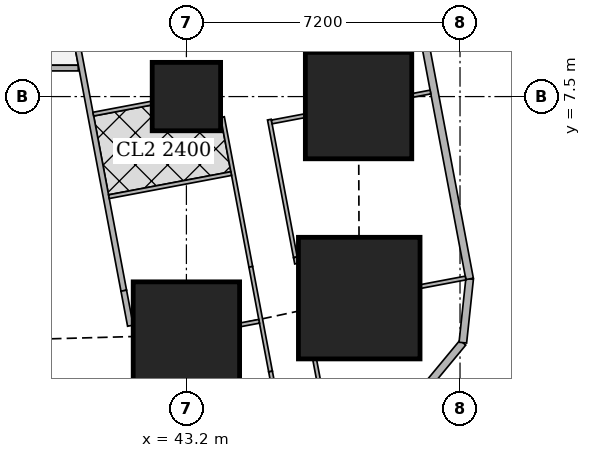
"""IFC4 building model, lengths in metres.
Left out: names, types, materials, properties, quantities, classifications, styles, units other than length and angle.
Written with IfcOpenShell. Run it as: python <this file> out.ifc"""

import sys

from ifc_helpers import new_model, si_unit, direction, frame, frame_2d, origin, origin_2d, place, context, subcontext, project, spatial, rectangle, extrude, element, fill, save


model = new_model("IFC4")
c1 = context("Model", 3, precision=1e-05, world=origin(), true_north=direction((0.0, 1.0)))
c2 = subcontext(c1, "Body", "Model", "MODEL_VIEW")
j1 = project(units=[si_unit("LENGTHUNIT", "METRE"), si_unit("PLANEANGLEUNIT", "RADIAN")], contexts=[c1])
p1 = place(None, origin())
s1 = spatial("IfcSite", under=j1, at=p1, CompositionType="ELEMENT")
p2 = place(p1, origin())
s2 = spatial("IfcBuilding", under=s1, at=p2, CompositionType="ELEMENT")
p3 = place(p2, frame((0.0, 0.0, 53.75)))
s3 = spatial("IfcBuildingStorey", under=s2, at=p3, CompositionType="ELEMENT", Elevation=53.75)
p4 = place(p3, frame((43.2, 1.225, 0.0), z_axis=(0.0, 0.0, 1.0), x_axis=(1.0, 0.0, 0.0)))
e1 = element("IfcColumn", 1, at=p4, inside=s3, PredefinedType="COLUMN", context=c2, shape_type="SweptSolid", body=[
    extrude(rectangle(XDim=2.8, YDim=2.8, at=origin_2d()), origin(), (0.0, 0.0, 1.0), 3.75),
])
p5 = place(p3, frame((47.748, 2.197, 0.0), z_axis=(0.0, 0.0, 1.0), x_axis=(1.0, 0.0, 0.0)))
e2 = element("IfcColumn", 2, at=p5, inside=s3, PredefinedType="COLUMN", context=c2, shape_type="SweptSolid", body=[
    extrude(rectangle(XDim=3.2, YDim=3.2, at=origin_2d()), origin(), (0.0, 0.0, 1.0), 3.75),
])
p6 = place(p3, frame((43.2, 7.5, 0.0), z_axis=(0.0, 0.0, 1.0), x_axis=(1.0, 0.0, 0.0)))
e3 = element("IfcColumn", 3, at=p6, inside=s3, PredefinedType="COLUMN", context=c2, shape_type="SweptSolid", body=[
    extrude(rectangle(XDim=1.8, YDim=1.8, at=origin_2d()), origin(), (0.0, 0.0, 1.0), 3.75),
])
p7 = place(p3, frame((47.73, 7.263, 0.0), z_axis=(0.0, 0.0, 1.0), x_axis=(1.0, 0.0, 0.0)))
e4 = element("IfcColumn", 4, at=p7, inside=s3, PredefinedType="COLUMN", context=c2, shape_type="SweptSolid", body=[
    extrude(rectangle(XDim=2.8, YDim=2.8, at=origin_2d()), origin(), (0.0, 0.0, 1.0), 3.75),
])
p8 = place(p3, frame((49.407, -0.263, 0.0), z_axis=(0.0, 0.0, 1.0), x_axis=(0.638042593423, 0.770001070764, 0.0)))
e5 = element("IfcWall", 5, at=p8, inside=s3, PredefinedType="SOLIDWALL", context=c2, shape_type="SweptSolid", body=[
    extrude(rectangle(XDim=1.673, YDim=0.2, at=frame_2d((0.836, 0.0))), origin(), (0.0, 0.0, 1.0), 3.5),
])
p9 = place(p3, frame((50.474, 1.025, 0.0), z_axis=(0.0, 0.0, 1.0), x_axis=(0.106047815515, 0.994361031429, 0.0)))
e6 = element("IfcWall", 6, at=p9, inside=s3, PredefinedType="SOLIDWALL", context=c2, shape_type="SweptSolid", body=[
    extrude(rectangle(XDim=1.688, YDim=0.2, at=frame_2d((0.844, 0.0))), origin(), (0.0, 0.0, 1.0), 3.5),
])
p10 = place(p3, frame((50.653, 2.703, 0.0), z_axis=(0.0, 0.0, 1.0), x_axis=(-0.185612026696, 0.982623109613, 0.0)))
e7 = element("IfcWall", 7, at=p10, inside=s3, PredefinedType="SOLIDWALL", context=c2, shape_type="SweptSolid", body=[
    extrude(rectangle(XDim=41.393, YDim=0.2, at=frame_2d((20.697, 0.0))), origin(), (0.0, 0.0, 1.0), 3.5),
])
p11 = place(p10, frame((1.633, 0.0, 0.9)))
e8 = element("IfcOpeningElement", 8, at=p11, cuts=e7, PredefinedType="OPENING", context=c2, shape_type="SweptSolid", body=[
    extrude(rectangle(XDim=1.8, YDim=1.5, at=frame_2d((0.9, 0.75))), frame((0.0, 0.11, 0.0), z_axis=(0.0, -1.0, 0.0), x_axis=(1.0, 0.0, 0.0)), (0.0, 0.0, 1.0), 0.22),
])
p12 = place(p10, frame((6.032, 0.0, 0.9)))
e9 = element("IfcOpeningElement", 9, at=p12, cuts=e7, PredefinedType="OPENING", context=c2, shape_type="SweptSolid", body=[
    extrude(rectangle(XDim=1.8, YDim=1.5, at=frame_2d((0.9, 0.75))), frame((0.0, 0.11, 0.0), z_axis=(0.0, -1.0, 0.0), x_axis=(1.0, 0.0, 0.0)), (0.0, 0.0, 1.0), 0.22),
])
p13 = place(p10, frame((9.848, 0.0, 0.9)))
e10 = element("IfcOpeningElement", 10, at=p13, cuts=e7, PredefinedType="OPENING", context=c2, shape_type="SweptSolid", body=[
    extrude(rectangle(XDim=1.8, YDim=1.5, at=frame_2d((0.9, 0.75))), frame((0.0, 0.11, 0.0), z_axis=(0.0, -1.0, 0.0), x_axis=(1.0, 0.0, 0.0)), (0.0, 0.0, 1.0), 0.22),
])
p14 = place(p10, frame((17.481, 0.0, 0.9)))
e11 = element("IfcOpeningElement", 11, at=p14, cuts=e7, PredefinedType="OPENING", context=c2, shape_type="SweptSolid", body=[
    extrude(rectangle(XDim=1.8, YDim=1.5, at=frame_2d((0.9, 0.75))), frame((0.0, 0.11, 0.0), z_axis=(0.0, -1.0, 0.0), x_axis=(1.0, 0.0, 0.0)), (0.0, 0.0, 1.0), 0.22),
])
p15 = place(p10, frame((21.297, 0.0, 0.9)))
e12 = element("IfcOpeningElement", 12, at=p15, cuts=e7, PredefinedType="OPENING", context=c2, shape_type="SweptSolid", body=[
    extrude(rectangle(XDim=1.8, YDim=1.5, at=frame_2d((0.9, 0.75))), frame((0.0, 0.11, 0.0), z_axis=(0.0, -1.0, 0.0), x_axis=(1.0, 0.0, 0.0)), (0.0, 0.0, 1.0), 0.22),
])
p16 = place(p10, frame((25.113, 0.0, 0.9)))
e13 = element("IfcOpeningElement", 13, at=p16, cuts=e7, PredefinedType="OPENING", context=c2, shape_type="SweptSolid", body=[
    extrude(rectangle(XDim=1.8, YDim=1.5, at=frame_2d((0.9, 0.75))), frame((0.0, 0.11, 0.0), z_axis=(0.0, -1.0, 0.0), x_axis=(1.0, 0.0, 0.0)), (0.0, 0.0, 1.0), 0.22),
])
p17 = place(p10, frame((28.93, 0.0, 0.9)))
e14 = element("IfcOpeningElement", 14, at=p17, cuts=e7, PredefinedType="OPENING", context=c2, shape_type="SweptSolid", body=[
    extrude(rectangle(XDim=1.8, YDim=1.5, at=frame_2d((0.9, 0.75))), frame((0.0, 0.11, 0.0), z_axis=(0.0, -1.0, 0.0), x_axis=(1.0, 0.0, 0.0)), (0.0, 0.0, 1.0), 0.22),
])
p18 = place(p10, frame((32.746, 0.0, 0.9)))
e15 = element("IfcOpeningElement", 15, at=p18, cuts=e7, PredefinedType="OPENING", context=c2, shape_type="SweptSolid", body=[
    extrude(rectangle(XDim=1.8, YDim=1.5, at=frame_2d((0.9, 0.75))), frame((0.0, 0.11, 0.0), z_axis=(0.0, -1.0, 0.0), x_axis=(1.0, 0.0, 0.0)), (0.0, 0.0, 1.0), 0.22),
])
p19 = place(p10, frame((36.481, 0.0, 0.9)))
e16 = element("IfcOpeningElement", 16, at=p19, cuts=e7, PredefinedType="OPENING", context=c2, shape_type="SweptSolid", body=[
    extrude(rectangle(XDim=1.8, YDim=1.5, at=frame_2d((0.9, 0.75))), frame((0.0, 0.11, 0.0), z_axis=(0.0, -1.0, 0.0), x_axis=(1.0, 0.0, 0.0)), (0.0, 0.0, 1.0), 0.22),
])
p20 = place(p3, frame((40.355, 8.25, 0.0), z_axis=(0.0, 0.0, 1.0), x_axis=(-1.0, 0.0, 0.0)))
e17 = element("IfcWall", 17, at=p20, inside=s3, PredefinedType="SOLIDWALL", context=c2, shape_type="SweptSolid", body=[
    extrude(rectangle(XDim=3.454, YDim=0.15, at=frame_2d((1.727, 0.0))), origin(), (0.0, 0.0, 1.0), 3.5),
])
p21 = place(p20, frame((0.15, 0.0, 0.0)))
e18 = element("IfcOpeningElement", 18, at=p21, cuts=e17, PredefinedType="OPENING", context=c2, shape_type="SweptSolid", body=[
    extrude(rectangle(XDim=1.0, YDim=2.1, at=frame_2d((0.5, 1.05))), frame((0.0, 0.085, 0.0), z_axis=(0.0, -1.0, 0.0), x_axis=(1.0, 0.0, 0.0)), (0.0, 0.0, 1.0), 0.17),
])
p22 = place(p3, frame((35.094, 36.585, 0.0), z_axis=(0.0, 0.0, 1.0), x_axis=(0.185588860311, -0.982627485331, 0.0)))
e19 = element("IfcWall", 19, at=p22, inside=s3, PredefinedType="SOLIDWALL", context=c2, shape_type="SweptSolid", body=[
    extrude(rectangle(XDim=34.797, YDim=0.15, at=frame_2d((17.399, 0.0))), origin(), (0.0, 0.0, 1.0), 2.5),
])
p23 = place(p22, frame((9.828, 0.0, 0.0)))
e20 = element("IfcOpeningElement", 20, at=p23, cuts=e19, PredefinedType="OPENING", context=c2, shape_type="SweptSolid", body=[
    extrude(rectangle(XDim=1.0, YDim=2.1, at=frame_2d((0.5, 1.05))), frame((0.0, 0.085, 0.0), z_axis=(0.0, -1.0, 0.0), x_axis=(1.0, 0.0, 0.0)), (0.0, 0.0, 1.0), 0.17),
])
p24 = place(p22, frame((13.645, 0.0, 0.0)))
e21 = element("IfcOpeningElement", 21, at=p24, cuts=e19, PredefinedType="OPENING", context=c2, shape_type="SweptSolid", body=[
    extrude(rectangle(XDim=1.0, YDim=2.1, at=frame_2d((0.5, 1.05))), frame((0.0, 0.085, 0.0), z_axis=(0.0, -1.0, 0.0), x_axis=(1.0, 0.0, 0.0)), (0.0, 0.0, 1.0), 0.17),
])
p25 = place(p22, frame((25.9, 0.0, 0.0)))
e22 = element("IfcOpeningElement", 22, at=p25, cuts=e19, PredefinedType="OPENING", context=c2, shape_type="SweptSolid", body=[
    extrude(rectangle(XDim=1.0, YDim=2.1, at=frame_2d((0.5, 1.05))), frame((0.0, 0.085, 0.0), z_axis=(0.0, -1.0, 0.0), x_axis=(1.0, 0.0, 0.0)), (0.0, 0.0, 1.0), 0.17),
])
p26 = place(p3, frame((41.552, 2.392, 0.0), z_axis=(0.0, 0.0, 1.0), x_axis=(0.185687800081, -0.982608793417, 0.0)))
e23 = element("IfcWall", 23, at=p26, inside=s3, PredefinedType="SOLIDWALL", context=c2, shape_type="SweptSolid", body=[
    extrude(rectangle(XDim=0.938, YDim=0.15, at=frame_2d((0.469, 0.0))), origin(), (0.0, 0.0, 1.0), 2.05),
])
p27 = place(p3, frame((45.383, 6.894, 0.0), z_axis=(0.0, 0.0, 1.0), x_axis=(0.185791461635, -0.982589198385, 0.0)))
e24 = element("IfcWall", 24, at=p27, inside=s3, PredefinedType="PARTITIONING", context=c2, shape_type="SweptSolid", body=[
    extrude(rectangle(XDim=3.687, YDim=0.1, at=frame_2d((1.844, 0.0))), origin(), (0.0, 0.0, 1.0), 3.5),
])
p28 = place(p27, frame((1.3, 0.0, 0.0)))
e25 = element("IfcOpeningElement", 25, at=p28, cuts=e24, PredefinedType="OPENING", context=c2, shape_type="SweptSolid", body=[
    extrude(rectangle(XDim=0.9, YDim=2.1, at=frame_2d((0.45, 1.05))), frame((0.0, 0.06, 0.0), z_axis=(0.0, -1.0, 0.0), x_axis=(1.0, 0.0, 0.0)), (0.0, 0.0, 1.0), 0.12),
])
p29 = place(p3, frame((46.068, 3.271, 0.0), z_axis=(0.0, 0.0, 1.0), x_axis=(0.183590240121, -0.98300286049, 0.0)))
e26 = element("IfcWall", 26, at=p29, inside=s3, PredefinedType="PARTITIONING", context=c2, shape_type="SweptSolid", body=[
    extrude(rectangle(XDim=0.169, YDim=0.1, at=frame_2d((0.084, 0.0))), origin(), (0.0, 0.0, 1.0), 2.05),
])
p30 = place(p3, frame((46.574, 0.587, 0.0), z_axis=(0.0, 0.0, 1.0), x_axis=(0.185997942803, -0.98255013372, 0.0)))
e27 = element("IfcWall", 27, at=p30, inside=s3, PredefinedType="PARTITIONING", context=c2, shape_type="SweptSolid", body=[
    extrude(rectangle(XDim=1.259, YDim=0.1, at=frame_2d((0.629, 0.0))), origin(), (0.0, 0.0, 1.0), 2.05),
])
p31 = place(p3, frame((44.149, 6.96, 0.0), z_axis=(0.0, 0.0, 1.0), x_axis=(0.185824941804, -0.982582867245, 0.0)))
e28 = element("IfcWall", 28, at=p31, inside=s3, PredefinedType="PARTITIONING", context=c2, shape_type="SweptSolid", body=[
    extrude(rectangle(XDim=4.01, YDim=0.1, at=frame_2d((2.005, 0.0))), origin(), (0.0, 0.0, 1.0), 3.5),
])
p32 = place(p31, frame((0.35, 0.0, 0.0)))
e29 = element("IfcOpeningElement", 29, at=p32, cuts=e28, PredefinedType="OPENING", context=c2, shape_type="SweptSolid", body=[
    extrude(rectangle(XDim=0.9, YDim=2.1, at=frame_2d((0.45, 1.05))), frame((0.0, 0.06, 0.0), z_axis=(0.0, -1.0, 0.0), x_axis=(1.0, 0.0, 0.0)), (0.0, 0.0, 1.0), 0.12),
])
p33 = place(p31, frame((1.856, 0.0, 0.0)))
e30 = element("IfcOpeningElement", 30, at=p33, cuts=e28, PredefinedType="OPENING", context=c2, shape_type="SweptSolid", body=[
    extrude(rectangle(XDim=0.9, YDim=2.1, at=frame_2d((0.45, 1.05))), frame((0.0, 0.06, 0.0), z_axis=(0.0, -1.0, 0.0), x_axis=(1.0, 0.0, 0.0)), (0.0, 0.0, 1.0), 0.12),
])
p34 = place(p3, frame((44.894, 3.02, 0.0), z_axis=(0.0, 0.0, 1.0), x_axis=(0.185471317237, -0.982649678412, 0.0)))
e31 = element("IfcWall", 31, at=p34, inside=s3, PredefinedType="PARTITIONING", context=c2, shape_type="SweptSolid", body=[
    extrude(rectangle(XDim=2.804, YDim=0.1, at=frame_2d((1.402, 0.0))), origin(), (0.0, 0.0, 1.0), 2.05),
])
p35 = place(p3, frame((45.414, 0.265, 0.0), z_axis=(0.0, 0.0, 1.0), x_axis=(0.185665855771, -0.982612940074, 0.0)))
e32 = element("IfcWall", 32, at=p35, inside=s3, PredefinedType="PARTITIONING", context=c2, shape_type="SweptSolid", body=[
    extrude(rectangle(XDim=0.931, YDim=0.1, at=frame_2d((0.465, 0.0))), origin(), (0.0, 0.0, 1.0), 3.5),
])
p36 = place(p3, frame((49.622, 7.62, 0.0), z_axis=(0.0, 0.0, 1.0), x_axis=(-0.982629142467, -0.185580086147, 0.0)))
e33 = element("IfcWall", 33, at=p36, inside=s3, PredefinedType="PARTITIONING", context=c2, shape_type="SweptSolid", body=[
    extrude(rectangle(XDim=0.491, YDim=0.1, at=frame_2d((0.245, 0.0))), origin(), (0.0, 0.0, 1.0), 3.5),
])
p37 = place(p3, frame((46.32, 6.997, 0.0), z_axis=(0.0, 0.0, 1.0), x_axis=(-0.982635224332, -0.185547880349, 0.0)))
e34 = element("IfcWall", 34, at=p37, inside=s3, PredefinedType="PARTITIONING", context=c2, shape_type="SweptSolid", body=[
    extrude(rectangle(XDim=0.889, YDim=0.1, at=frame_2d((0.445, 0.0))), origin(), (0.0, 0.0, 1.0), 3.5),
])
p38 = place(p3, frame((50.547, 2.726, 0.0), z_axis=(0.0, 0.0, 1.0), x_axis=(-0.982553313503, -0.185981144539, 0.0)))
e35 = element("IfcWall", 35, at=p38, inside=s3, PredefinedType="PARTITIONING", context=c2, shape_type="SweptSolid", body=[
    extrude(rectangle(XDim=1.21, YDim=0.1, at=frame_2d((0.605, 0.0))), origin(), (0.0, 0.0, 1.0), 3.5),
])
p39 = place(p3, frame((42.29, 7.329, 0.0), z_axis=(0.0, 0.0, 1.0), x_axis=(-0.98258870752, -0.18579405764, 0.0)))
e36 = element("IfcWall", 36, at=p39, inside=s3, PredefinedType="PARTITIONING", context=c2, shape_type="SweptSolid", body=[
    extrude(rectangle(XDim=1.566, YDim=0.1, at=frame_2d((0.783, 0.0))), origin(), (0.0, 0.0, 1.0), 3.5),
])
p40 = place(p3, frame((45.114, 1.587, 0.0), z_axis=(0.0, 0.0, 1.0), x_axis=(-0.982699277433, -0.185208342501, 0.0)))
e37 = element("IfcWall", 37, at=p40, inside=s3, PredefinedType="PARTITIONING", context=c2, shape_type="SweptSolid", body=[
    extrude(rectangle(XDim=0.513, YDim=0.1, at=frame_2d((0.256, 0.0))), origin(), (0.0, 0.0, 1.0), 2.05),
])
p41 = place(p3, frame((44.379, 5.474, 0.0), z_axis=(0.0, 0.0, 1.0), x_axis=(-0.982607026909, -0.185697147715, 0.0)))
e38 = element("IfcWall", 38, at=p41, inside=s3, PredefinedType="PARTITIONING", context=c2, shape_type="SweptSolid", body=[
    extrude(rectangle(XDim=3.275, YDim=0.1, at=frame_2d((1.637, 0.0))), origin(), (0.0, 0.0, 1.0), 3.5),
])
p42 = place(p11, origin())
e39 = element("IfcWindow", 39, at=p42, inside=s3, PartitioningType="SINGLE_PANEL", PredefinedType="WINDOW", context=c2, shape_type="SweptSolid", body=[
    extrude(rectangle(XDim=1.8, YDim=1.5, at=frame_2d((0.9, 0.75))), frame((0.0, 0.03, 0.0), z_axis=(0.0, -1.0, 0.0), x_axis=(1.0, 0.0, 0.0)), (0.0, 0.0, 1.0), 0.06),
])
fill(e8, e39)
p43 = place(p12, origin())
e40 = element("IfcWindow", 40, at=p43, inside=s3, PartitioningType="SINGLE_PANEL", PredefinedType="WINDOW", context=c2, shape_type="SweptSolid", body=[
    extrude(rectangle(XDim=1.8, YDim=1.5, at=frame_2d((0.9, 0.75))), frame((0.0, 0.03, 0.0), z_axis=(0.0, -1.0, 0.0), x_axis=(1.0, 0.0, 0.0)), (0.0, 0.0, 1.0), 0.06),
])
fill(e9, e40)
p44 = place(p21, origin())
e41 = element("IfcDoor", 41, at=p44, inside=s3, OperationType="SINGLE_SWING_LEFT", PredefinedType="DOOR", context=c2, shape_type="SweptSolid", body=[
    extrude(rectangle(XDim=1.0, YDim=2.1, at=frame_2d((0.5, 1.05))), frame((0.0, 0.025, 0.0), z_axis=(0.0, -1.0, 0.0), x_axis=(1.0, 0.0, 0.0)), (0.0, 0.0, 1.0), 0.05),
])
fill(e18, e41)
p45 = place(p28, origin())
e42 = element("IfcDoor", 42, at=p45, inside=s3, OperationType="SINGLE_SWING_LEFT", PredefinedType="DOOR", context=c2, shape_type="SweptSolid", body=[
    extrude(rectangle(XDim=0.9, YDim=2.1, at=frame_2d((0.45, 1.05))), frame((0.0, 0.025, 0.0), z_axis=(0.0, -1.0, 0.0), x_axis=(1.0, 0.0, 0.0)), (0.0, 0.0, 1.0), 0.05),
])
fill(e25, e42)
p46 = place(p32, origin())
e43 = element("IfcDoor", 43, at=p46, inside=s3, OperationType="SINGLE_SWING_RIGHT", PredefinedType="DOOR", context=c2, shape_type="SweptSolid", body=[
    extrude(rectangle(XDim=0.9, YDim=2.1, at=frame_2d((0.45, 1.05))), frame((0.0, 0.025, 0.0), z_axis=(0.0, -1.0, 0.0), x_axis=(1.0, 0.0, 0.0)), (0.0, 0.0, 1.0), 0.05),
])
fill(e29, e43)
p47 = place(p33, origin())
e44 = element("IfcDoor", 44, at=p47, inside=s3, OperationType="SINGLE_SWING_RIGHT", PredefinedType="DOOR", context=c2, shape_type="SweptSolid", body=[
    extrude(rectangle(XDim=0.9, YDim=2.1, at=frame_2d((0.45, 1.05))), frame((0.0, 0.025, 0.0), z_axis=(0.0, -1.0, 0.0), x_axis=(1.0, 0.0, 0.0)), (0.0, 0.0, 1.0), 0.05),
])
fill(e30, e44)
save(model, sys.argv[1])
